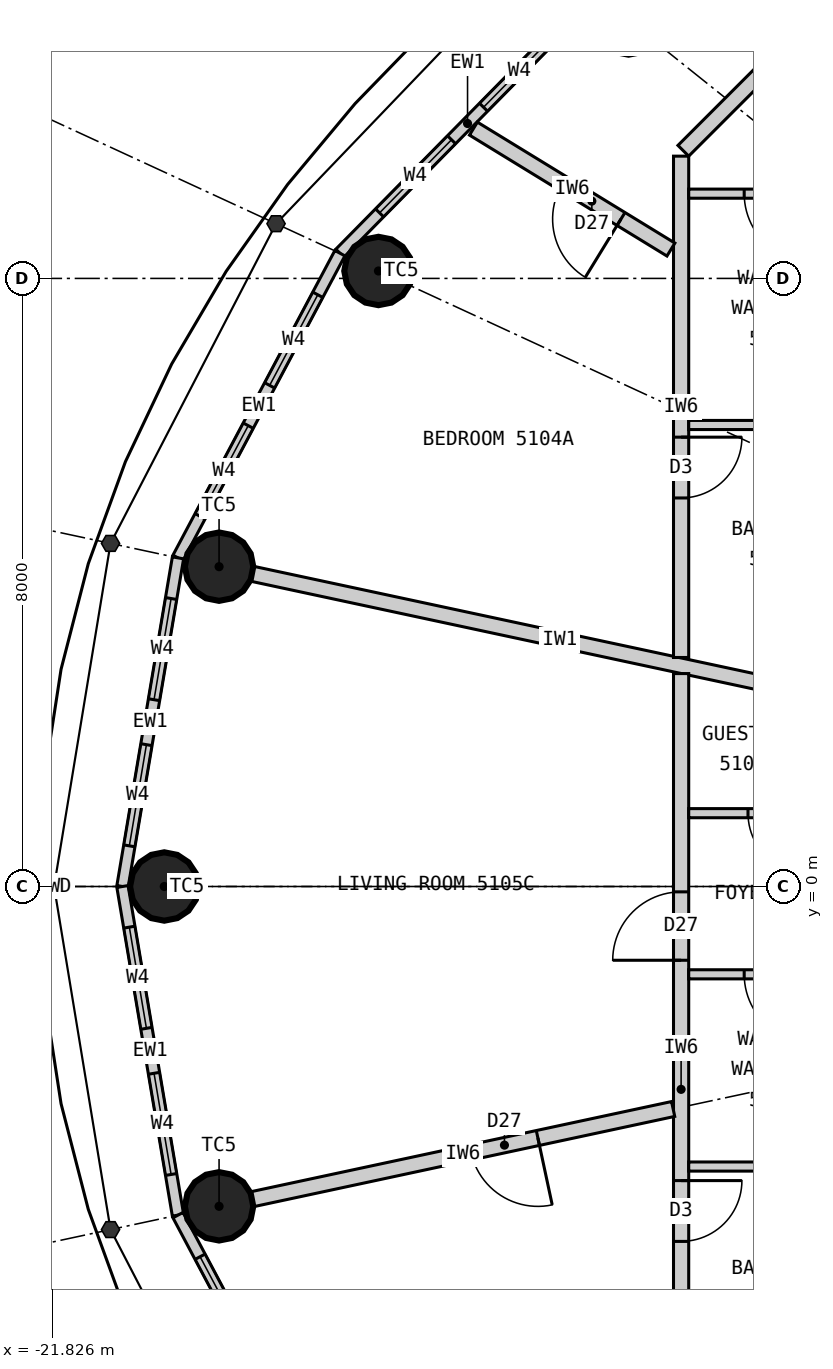
"""IFC4 building model, lengths in metres.
Left out: names, types, materials, properties, quantities, classifications, styles, units other than length and angle.
Written with IfcOpenShell. Run it as: python <this file> out.ifc"""

import sys

from ifc_helpers import new_model, si_unit, direction, frame, frame_2d, origin, origin_2d, place, context, subcontext, project, spatial, rectangle, circle, extrude, element, fill, save


model = new_model("IFC4")
c1 = context("Model", 3, precision=1e-05, world=origin(), true_north=direction((0.0, 1.0)))
c2 = subcontext(c1, "Body", "Model", "MODEL_VIEW")
j1 = project(units=[si_unit("LENGTHUNIT", "METRE"), si_unit("PLANEANGLEUNIT", "RADIAN")], contexts=[c1])
p1 = place(None, origin())
s1 = spatial("IfcSite", under=j1, at=p1, CompositionType="ELEMENT")
p2 = place(p1, origin())
s2 = spatial("IfcBuilding", under=s1, at=p2, CompositionType="ELEMENT")
p3 = place(p2, frame((0.0, 0.0, 192.9)))
s3 = spatial("IfcBuildingStorey", under=s2, at=p3, CompositionType="ELEMENT", Elevation=192.9)
for number, where, z_axis, x_axis in (
    (1, (-14.241, 11.393, 0.0), (0.0, 0.0, 1.0), (1.0, 0.0, 0.0)),
    (2, (-17.532, 8.098, 0.0), (0.0, 0.0, 1.0), (1.0, 0.0, 0.0)),
    (3, (-19.629, 4.208, 0.0), (0.0, 0.0, 1.0), (1.0, 0.0, 0.0)),
    (4, (-20.35, 0.0, 0.0), (0.0, 0.0, 1.0), (1.0, 0.0, 0.0)),
    (5, (-19.629, -4.208, 0.0), (0.0, 0.0, 1.0), (1.0, 0.0, 0.0)),
):
    element("IfcColumn", number, at=place(p3, frame(where, z_axis=z_axis, x_axis=x_axis)), inside=s3, PredefinedType="COLUMN", context=c2, shape_type="SweptSolid", body=[
        extrude(circle(Radius=0.45, at=origin_2d()), origin(), (0.0, 0.0, 1.0), 3.3),
    ])
p4 = place(p3, frame((-14.68, 11.744, 0.0), z_axis=(0.0, 0.0, 1.0), x_axis=(-0.701527379618, -0.712642501993, 0.0)))
e6 = element("IfcWall", 6, at=p4, inside=s3, PredefinedType="ELEMENTEDWALL", context=c2, shape_type="SweptSolid", body=[
    extrude(rectangle(XDim=4.788, YDim=0.15, at=frame_2d((2.394, 0.0))), origin(), (0.0, 0.0, 1.0), 3.12),
])
p5 = place(p4, frame((0.744, 0.0, 0.9)))
e7 = element("IfcOpeningElement", 7, at=p5, cuts=e6, PredefinedType="OPENING", context=c2, shape_type="SweptSolid", body=[
    extrude(rectangle(XDim=1.35, YDim=1.9, at=frame_2d((0.675, 0.95))), frame((0.0, 0.085, 0.0), z_axis=(0.0, -1.0, 0.0), x_axis=(1.0, 0.0, 0.0)), (0.0, 0.0, 1.0), 0.17),
])
p6 = place(p4, frame((2.694, 0.0, 0.9)))
e8 = element("IfcOpeningElement", 8, at=p6, cuts=e6, PredefinedType="OPENING", context=c2, shape_type="SweptSolid", body=[
    extrude(rectangle(XDim=1.35, YDim=1.9, at=frame_2d((0.675, 0.95))), frame((0.0, 0.085, 0.0), z_axis=(0.0, -1.0, 0.0), x_axis=(1.0, 0.0, 0.0)), (0.0, 0.0, 1.0), 0.17),
])
p7 = place(p3, frame((-18.04, 8.332, 0.0), z_axis=(0.0, 0.0, 1.0), x_axis=(-0.469256152955, -0.883062094597, 0.0)))
e9 = element("IfcWall", 9, at=p7, inside=s3, PredefinedType="ELEMENTEDWALL", context=c2, shape_type="SweptSolid", body=[
    extrude(rectangle(XDim=4.539, YDim=0.15, at=frame_2d((2.27, 0.0))), origin(), (0.0, 0.0, 1.0), 3.12),
])
p8 = place(p7, frame((0.62, 0.0, 0.9)))
e10 = element("IfcOpeningElement", 10, at=p8, cuts=e9, PredefinedType="OPENING", context=c2, shape_type="SweptSolid", body=[
    extrude(rectangle(XDim=1.35, YDim=1.9, at=frame_2d((0.675, 0.95))), frame((0.0, 0.085, 0.0), z_axis=(0.0, -1.0, 0.0), x_axis=(1.0, 0.0, 0.0)), (0.0, 0.0, 1.0), 0.17),
])
p9 = place(p7, frame((2.57, 0.0, 0.9)))
e11 = element("IfcOpeningElement", 11, at=p9, cuts=e9, PredefinedType="OPENING", context=c2, shape_type="SweptSolid", body=[
    extrude(rectangle(XDim=1.35, YDim=1.9, at=frame_2d((0.675, 0.95))), frame((0.0, 0.085, 0.0), z_axis=(0.0, -1.0, 0.0), x_axis=(1.0, 0.0, 0.0)), (0.0, 0.0, 1.0), 0.17),
])
p10 = place(p3, frame((-20.17, 4.323, 0.0), z_axis=(0.0, 0.0, 1.0), x_axis=(-0.166538513568, -0.986034950445, 0.0)))
e12 = element("IfcWall", 12, at=p10, inside=s3, PredefinedType="ELEMENTEDWALL", context=c2, shape_type="SweptSolid", body=[
    extrude(rectangle(XDim=4.385, YDim=0.15, at=frame_2d((2.192, 0.0))), origin(), (0.0, 0.0, 1.0), 3.12),
])
p11 = place(p10, frame((0.542, 0.0, 0.9)))
e13 = element("IfcOpeningElement", 13, at=p11, cuts=e12, PredefinedType="OPENING", context=c2, shape_type="SweptSolid", body=[
    extrude(rectangle(XDim=1.35, YDim=1.9, at=frame_2d((0.675, 0.95))), frame((0.0, 0.085, 0.0), z_axis=(0.0, -1.0, 0.0), x_axis=(1.0, 0.0, 0.0)), (0.0, 0.0, 1.0), 0.17),
])
p12 = place(p10, frame((2.492, 0.0, 0.9)))
e14 = element("IfcOpeningElement", 14, at=p12, cuts=e12, PredefinedType="OPENING", context=c2, shape_type="SweptSolid", body=[
    extrude(rectangle(XDim=1.35, YDim=1.9, at=frame_2d((0.675, 0.95))), frame((0.0, 0.085, 0.0), z_axis=(0.0, -1.0, 0.0), x_axis=(1.0, 0.0, 0.0)), (0.0, 0.0, 1.0), 0.17),
])
p13 = place(p3, frame((-20.9, 0.0, 0.0), z_axis=(0.0, 0.0, 1.0), x_axis=(0.166538513568, -0.986034950445, 0.0)))
e15 = element("IfcWall", 15, at=p13, inside=s3, PredefinedType="ELEMENTEDWALL", context=c2, shape_type="SweptSolid", body=[
    extrude(rectangle(XDim=4.385, YDim=0.15, at=frame_2d((2.192, 0.0))), origin(), (0.0, 0.0, 1.0), 3.12),
])
p14 = place(p13, frame((0.542, 0.0, 0.9)))
e16 = element("IfcOpeningElement", 16, at=p14, cuts=e15, PredefinedType="OPENING", context=c2, shape_type="SweptSolid", body=[
    extrude(rectangle(XDim=1.35, YDim=1.9, at=frame_2d((0.675, 0.95))), frame((0.0, 0.085, 0.0), z_axis=(0.0, -1.0, 0.0), x_axis=(1.0, 0.0, 0.0)), (0.0, 0.0, 1.0), 0.17),
])
p15 = place(p13, frame((2.492, 0.0, 0.9)))
e17 = element("IfcOpeningElement", 17, at=p15, cuts=e15, PredefinedType="OPENING", context=c2, shape_type="SweptSolid", body=[
    extrude(rectangle(XDim=1.35, YDim=1.9, at=frame_2d((0.675, 0.95))), frame((0.0, 0.085, 0.0), z_axis=(0.0, -1.0, 0.0), x_axis=(1.0, 0.0, 0.0)), (0.0, 0.0, 1.0), 0.17),
])
p16 = place(p3, frame((-20.17, -4.323, 0.0), z_axis=(0.0, 0.0, 1.0), x_axis=(0.469256152955, -0.883062094597, 0.0)))
e18 = element("IfcWall", 18, at=p16, inside=s3, PredefinedType="ELEMENTEDWALL", context=c2, shape_type="SweptSolid", body=[
    extrude(rectangle(XDim=4.539, YDim=0.15, at=frame_2d((2.27, 0.0))), origin(), (0.0, 0.0, 1.0), 3.12),
])
p17 = place(p16, frame((0.62, 0.0, 0.9)))
e19 = element("IfcOpeningElement", 19, at=p17, cuts=e18, PredefinedType="OPENING", context=c2, shape_type="SweptSolid", body=[
    extrude(rectangle(XDim=1.35, YDim=1.9, at=frame_2d((0.675, 0.95))), frame((0.0, 0.085, 0.0), z_axis=(0.0, -1.0, 0.0), x_axis=(1.0, 0.0, 0.0)), (0.0, 0.0, 1.0), 0.17),
])
p18 = place(p16, frame((2.57, 0.0, 0.9)))
e20 = element("IfcOpeningElement", 20, at=p18, cuts=e18, PredefinedType="OPENING", context=c2, shape_type="SweptSolid", body=[
    extrude(rectangle(XDim=1.35, YDim=1.9, at=frame_2d((0.675, 0.95))), frame((0.0, 0.085, 0.0), z_axis=(0.0, -1.0, 0.0), x_axis=(1.0, 0.0, 0.0)), (0.0, 0.0, 1.0), 0.17),
])
p19 = place(p3, frame((-11.1, 2.379, 0.0), z_axis=(0.0, 0.0, 1.0), x_axis=(-0.977789888126, 0.209587534647, 0.0)))
e21 = element("IfcWall", 21, at=p19, inside=s3, PredefinedType="PARTITIONING", context=c2, shape_type="SweptSolid", body=[
    extrude(rectangle(XDim=8.273, YDim=0.2, at=frame_2d((4.136, 0.0))), origin(), (0.0, 0.0, 1.0), 2.27),
])
p20 = place(p3, frame((-10.679, 12.521, 0.0), z_axis=(0.0, 0.0, 1.0), x_axis=(-0.707106781187, -0.707106781187, 0.0)))
e22 = element("IfcWall", 22, at=p20, inside=s3, PredefinedType="PARTITIONING", context=c2, shape_type="SweptSolid", body=[
    extrude(rectangle(XDim=4.019, YDim=0.2, at=frame_2d((2.009, 0.0))), origin(), (0.0, 0.0, 1.0), 3.12),
])
p21 = place(p3, frame((-13.55, 9.609, 0.0), z_axis=(0.0, 0.0, 1.0), x_axis=(0.0, -1.0, 0.0)))
e23 = element("IfcWall", 23, at=p21, inside=s3, PredefinedType="PARTITIONING", context=c2, shape_type="SweptSolid", body=[
    extrude(rectangle(XDim=6.596, YDim=0.2, at=frame_2d((3.298, 0.0))), origin(), (0.0, 0.0, 1.0), 3.12),
])
p22 = place(p21, frame((3.697, 0.0, 0.0)))
e24 = element("IfcOpeningElement", 24, at=p22, cuts=e23, PredefinedType="OPENING", context=c2, shape_type="SweptSolid", body=[
    extrude(rectangle(XDim=0.8, YDim=2.1, at=frame_2d((0.4, 1.05))), frame((0.0, 0.11, 0.0), z_axis=(0.0, -1.0, 0.0), x_axis=(1.0, 0.0, 0.0)), (0.0, 0.0, 1.0), 0.22),
])
p23 = place(p3, frame((-13.684, 8.38, 0.0), z_axis=(0.0, 0.0, 1.0), x_axis=(-0.852784302627, 0.522263279576, 0.0)))
e25 = element("IfcWall", 25, at=p23, inside=s3, PredefinedType="PARTITIONING", context=c2, shape_type="SweptSolid", body=[
    extrude(rectangle(XDim=3.047, YDim=0.2, at=frame_2d((1.523, 0.0))), origin(), (0.0, 0.0, 1.0), 3.12),
])
p24 = place(p23, frame((0.77, 0.0, 0.0)))
e26 = element("IfcOpeningElement", 26, at=p24, cuts=e25, PredefinedType="OPENING", context=c2, shape_type="SweptSolid", body=[
    extrude(rectangle(XDim=0.9, YDim=2.1, at=frame_2d((0.45, 1.05))), frame((0.0, 0.11, 0.0), z_axis=(0.0, -1.0, 0.0), x_axis=(1.0, 0.0, 0.0)), (0.0, 0.0, 1.0), 0.22),
])
p25 = place(p3, frame((-11.1, 9.115, 0.0), z_axis=(0.0, 0.0, 1.0), x_axis=(-1.0, 0.0, 0.0)))
e27 = element("IfcWall", 27, at=p25, inside=s3, PredefinedType="PARTITIONING", context=c2, shape_type="SweptSolid", body=[
    extrude(rectangle(XDim=2.35, YDim=0.12, at=frame_2d((1.175, 0.0))), origin(), (0.0, 0.0, 1.0), 3.12),
])
p26 = place(p25, frame((0.72, 0.0, 0.0)))
e28 = element("IfcOpeningElement", 28, at=p26, cuts=e27, PredefinedType="OPENING", context=c2, shape_type="SweptSolid", body=[
    extrude(rectangle(XDim=0.9, YDim=2.1, at=frame_2d((0.45, 1.05))), frame((0.0, 0.07, 0.0), z_axis=(0.0, -1.0, 0.0), x_axis=(1.0, 0.0, 0.0)), (0.0, 0.0, 1.0), 0.14),
])
p27 = place(p3, frame((-11.1, 6.072, 0.0), z_axis=(0.0, 0.0, 1.0), x_axis=(-1.0, 0.0, 0.0)))
e29 = element("IfcWall", 29, at=p27, inside=s3, PredefinedType="PARTITIONING", context=c2, shape_type="SweptSolid", body=[
    extrude(rectangle(XDim=2.35, YDim=0.12, at=frame_2d((1.175, 0.0))), origin(), (0.0, 0.0, 1.0), 3.12),
])
p28 = place(p3, frame((-13.55, 2.801, 0.0), z_axis=(0.0, 0.0, 1.0), x_axis=(0.0, -1.0, 0.0)))
e30 = element("IfcWall", 30, at=p28, inside=s3, PredefinedType="PARTITIONING", context=c2, shape_type="SweptSolid", body=[
    extrude(rectangle(XDim=10.94, YDim=0.2, at=frame_2d((5.47, 0.0))), origin(), (0.0, 0.0, 1.0), 3.12),
])
p29 = place(p28, frame((6.67, 0.0, 0.0)))
e31 = element("IfcOpeningElement", 31, at=p29, cuts=e30, PredefinedType="OPENING", context=c2, shape_type="SweptSolid", body=[
    extrude(rectangle(XDim=0.8, YDim=2.1, at=frame_2d((0.4, 1.05))), frame((0.0, 0.11, 0.0), z_axis=(0.0, -1.0, 0.0), x_axis=(1.0, 0.0, 0.0)), (0.0, 0.0, 1.0), 0.22),
])
p30 = place(p28, frame((2.872, 0.0, 0.0)))
e32 = element("IfcOpeningElement", 32, at=p30, cuts=e30, PredefinedType="OPENING", context=c2, shape_type="SweptSolid", body=[
    extrude(rectangle(XDim=0.9, YDim=2.1, at=frame_2d((0.45, 1.05))), frame((0.0, 0.11, 0.0), z_axis=(0.0, -1.0, 0.0), x_axis=(1.0, 0.0, 0.0)), (0.0, 0.0, 1.0), 0.22),
])
p31 = place(p3, frame((-13.655, -2.927, 0.0), z_axis=(0.0, 0.0, 1.0), x_axis=(-0.977790419294, -0.209585056568, 0.0)))
e33 = element("IfcWall", 33, at=p31, inside=s3, PredefinedType="PARTITIONING", context=c2, shape_type="SweptSolid", body=[
    extrude(rectangle(XDim=5.66, YDim=0.2, at=frame_2d((2.83, 0.0))), origin(), (0.0, 0.0, 1.0), 2.27),
])
p32 = place(p31, frame((1.82, 0.0, 0.0)))
e34 = element("IfcOpeningElement", 34, at=p32, cuts=e33, PredefinedType="OPENING", context=c2, shape_type="SweptSolid", body=[
    extrude(rectangle(XDim=0.9, YDim=2.1, at=frame_2d((0.45, 1.05))), frame((0.0, 0.11, 0.0), z_axis=(0.0, -1.0, 0.0), x_axis=(1.0, 0.0, 0.0)), (0.0, 0.0, 1.0), 0.22),
])
p33 = place(p3, frame((-11.1, 0.965, 0.0), z_axis=(0.0, 0.0, 1.0), x_axis=(-1.0, 0.0, 0.0)))
e35 = element("IfcWall", 35, at=p33, inside=s3, PredefinedType="PARTITIONING", context=c2, shape_type="SweptSolid", body=[
    extrude(rectangle(XDim=2.35, YDim=0.12, at=frame_2d((1.175, 0.0))), origin(), (0.0, 0.0, 1.0), 3.12),
])
p34 = place(p33, frame((0.77, 0.0, 0.0)))
e36 = element("IfcOpeningElement", 36, at=p34, cuts=e35, PredefinedType="OPENING", context=c2, shape_type="SweptSolid", body=[
    extrude(rectangle(XDim=0.8, YDim=2.1, at=frame_2d((0.4, 1.05))), frame((0.0, 0.07, 0.0), z_axis=(0.0, -1.0, 0.0), x_axis=(1.0, 0.0, 0.0)), (0.0, 0.0, 1.0), 0.14),
])
p35 = place(p3, frame((-11.1, -1.155, 0.0), z_axis=(0.0, 0.0, 1.0), x_axis=(-1.0, 0.0, 0.0)))
e37 = element("IfcWall", 37, at=p35, inside=s3, PredefinedType="PARTITIONING", context=c2, shape_type="SweptSolid", body=[
    extrude(rectangle(XDim=2.35, YDim=0.12, at=frame_2d((1.175, 0.0))), origin(), (0.0, 0.0, 1.0), 3.12),
])
p36 = place(p35, frame((0.72, 0.0, 0.0)))
e38 = element("IfcOpeningElement", 38, at=p36, cuts=e37, PredefinedType="OPENING", context=c2, shape_type="SweptSolid", body=[
    extrude(rectangle(XDim=0.9, YDim=2.1, at=frame_2d((0.45, 1.05))), frame((0.0, 0.07, 0.0), z_axis=(0.0, -1.0, 0.0), x_axis=(1.0, 0.0, 0.0)), (0.0, 0.0, 1.0), 0.14),
])
p37 = place(p3, frame((-11.1, -3.684, 0.0), z_axis=(0.0, 0.0, 1.0), x_axis=(-1.0, 0.0, 0.0)))
e39 = element("IfcWall", 39, at=p37, inside=s3, PredefinedType="PARTITIONING", context=c2, shape_type="SweptSolid", body=[
    extrude(rectangle(XDim=2.35, YDim=0.12, at=frame_2d((1.175, 0.0))), origin(), (0.0, 0.0, 1.0), 3.12),
])
p38 = place(p5, origin())
e40 = element("IfcWindow", 40, at=p38, inside=s3, PartitioningType="SINGLE_PANEL", PredefinedType="WINDOW", context=c2, shape_type="SweptSolid", body=[
    extrude(rectangle(XDim=1.35, YDim=1.9, at=frame_2d((0.675, 0.95))), frame((0.0, 0.03, 0.0), z_axis=(0.0, -1.0, 0.0), x_axis=(1.0, 0.0, 0.0)), (0.0, 0.0, 1.0), 0.06),
])
fill(e7, e40)
p39 = place(p6, origin())
e41 = element("IfcWindow", 41, at=p39, inside=s3, PartitioningType="SINGLE_PANEL", PredefinedType="WINDOW", context=c2, shape_type="SweptSolid", body=[
    extrude(rectangle(XDim=1.35, YDim=1.9, at=frame_2d((0.675, 0.95))), frame((0.0, 0.03, 0.0), z_axis=(0.0, -1.0, 0.0), x_axis=(1.0, 0.0, 0.0)), (0.0, 0.0, 1.0), 0.06),
])
fill(e8, e41)
p40 = place(p8, origin())
e42 = element("IfcWindow", 42, at=p40, inside=s3, PartitioningType="SINGLE_PANEL", PredefinedType="WINDOW", context=c2, shape_type="SweptSolid", body=[
    extrude(rectangle(XDim=1.35, YDim=1.9, at=frame_2d((0.675, 0.95))), frame((0.0, 0.03, 0.0), z_axis=(0.0, -1.0, 0.0), x_axis=(1.0, 0.0, 0.0)), (0.0, 0.0, 1.0), 0.06),
])
fill(e10, e42)
p41 = place(p9, origin())
e43 = element("IfcWindow", 43, at=p41, inside=s3, PartitioningType="SINGLE_PANEL", PredefinedType="WINDOW", context=c2, shape_type="SweptSolid", body=[
    extrude(rectangle(XDim=1.35, YDim=1.9, at=frame_2d((0.675, 0.95))), frame((0.0, 0.03, 0.0), z_axis=(0.0, -1.0, 0.0), x_axis=(1.0, 0.0, 0.0)), (0.0, 0.0, 1.0), 0.06),
])
fill(e11, e43)
p42 = place(p11, origin())
e44 = element("IfcWindow", 44, at=p42, inside=s3, PartitioningType="SINGLE_PANEL", PredefinedType="WINDOW", context=c2, shape_type="SweptSolid", body=[
    extrude(rectangle(XDim=1.35, YDim=1.9, at=frame_2d((0.675, 0.95))), frame((0.0, 0.03, 0.0), z_axis=(0.0, -1.0, 0.0), x_axis=(1.0, 0.0, 0.0)), (0.0, 0.0, 1.0), 0.06),
])
fill(e13, e44)
p43 = place(p12, origin())
e45 = element("IfcWindow", 45, at=p43, inside=s3, PartitioningType="SINGLE_PANEL", PredefinedType="WINDOW", context=c2, shape_type="SweptSolid", body=[
    extrude(rectangle(XDim=1.35, YDim=1.9, at=frame_2d((0.675, 0.95))), frame((0.0, 0.03, 0.0), z_axis=(0.0, -1.0, 0.0), x_axis=(1.0, 0.0, 0.0)), (0.0, 0.0, 1.0), 0.06),
])
fill(e14, e45)
p44 = place(p14, origin())
e46 = element("IfcWindow", 46, at=p44, inside=s3, PartitioningType="SINGLE_PANEL", PredefinedType="WINDOW", context=c2, shape_type="SweptSolid", body=[
    extrude(rectangle(XDim=1.35, YDim=1.9, at=frame_2d((0.675, 0.95))), frame((0.0, 0.03, 0.0), z_axis=(0.0, -1.0, 0.0), x_axis=(1.0, 0.0, 0.0)), (0.0, 0.0, 1.0), 0.06),
])
fill(e16, e46)
p45 = place(p15, origin())
e47 = element("IfcWindow", 47, at=p45, inside=s3, PartitioningType="SINGLE_PANEL", PredefinedType="WINDOW", context=c2, shape_type="SweptSolid", body=[
    extrude(rectangle(XDim=1.35, YDim=1.9, at=frame_2d((0.675, 0.95))), frame((0.0, 0.03, 0.0), z_axis=(0.0, -1.0, 0.0), x_axis=(1.0, 0.0, 0.0)), (0.0, 0.0, 1.0), 0.06),
])
fill(e17, e47)
p46 = place(p17, origin())
e48 = element("IfcWindow", 48, at=p46, inside=s3, PartitioningType="SINGLE_PANEL", PredefinedType="WINDOW", context=c2, shape_type="SweptSolid", body=[
    extrude(rectangle(XDim=1.35, YDim=1.9, at=frame_2d((0.675, 0.95))), frame((0.0, 0.03, 0.0), z_axis=(0.0, -1.0, 0.0), x_axis=(1.0, 0.0, 0.0)), (0.0, 0.0, 1.0), 0.06),
])
fill(e19, e48)
p47 = place(p26, origin())
e49 = element("IfcDoor", 49, at=p47, inside=s3, OperationType="SINGLE_SWING_LEFT", PredefinedType="DOOR", context=c2, shape_type="SweptSolid", body=[
    extrude(rectangle(XDim=0.9, YDim=2.1, at=frame_2d((0.45, 1.05))), frame((0.0, 0.025, 0.0), z_axis=(0.0, -1.0, 0.0), x_axis=(1.0, 0.0, 0.0)), (0.0, 0.0, 1.0), 0.05),
])
fill(e28, e49)
p48 = place(p22, origin())
e50 = element("IfcDoor", 50, at=p48, inside=s3, OperationType="SINGLE_SWING_LEFT", PredefinedType="DOOR", context=c2, shape_type="SweptSolid", body=[
    extrude(rectangle(XDim=0.8, YDim=2.1, at=frame_2d((0.4, 1.05))), frame((0.0, 0.025, 0.0), z_axis=(0.0, -1.0, 0.0), x_axis=(1.0, 0.0, 0.0)), (0.0, 0.0, 1.0), 0.05),
])
fill(e24, e50)
p49 = place(p24, origin())
e51 = element("IfcDoor", 51, at=p49, inside=s3, OperationType="SINGLE_SWING_LEFT", PredefinedType="DOOR", context=c2, shape_type="SweptSolid", body=[
    extrude(rectangle(XDim=0.9, YDim=2.1, at=frame_2d((0.45, 1.05))), frame((0.0, 0.025, 0.0), z_axis=(0.0, -1.0, 0.0), x_axis=(1.0, 0.0, 0.0)), (0.0, 0.0, 1.0), 0.05),
])
fill(e26, e51)
p50 = place(p34, origin())
e52 = element("IfcDoor", 52, at=p50, inside=s3, OperationType="SINGLE_SWING_LEFT", PredefinedType="DOOR", context=c2, shape_type="SweptSolid", body=[
    extrude(rectangle(XDim=0.8, YDim=2.1, at=frame_2d((0.4, 1.05))), frame((0.0, 0.025, 0.0), z_axis=(0.0, -1.0, 0.0), x_axis=(1.0, 0.0, 0.0)), (0.0, 0.0, 1.0), 0.05),
])
fill(e36, e52)
p51 = place(p36, origin())
e53 = element("IfcDoor", 53, at=p51, inside=s3, OperationType="SINGLE_SWING_LEFT", PredefinedType="DOOR", context=c2, shape_type="SweptSolid", body=[
    extrude(rectangle(XDim=0.9, YDim=2.1, at=frame_2d((0.45, 1.05))), frame((0.0, 0.025, 0.0), z_axis=(0.0, -1.0, 0.0), x_axis=(1.0, 0.0, 0.0)), (0.0, 0.0, 1.0), 0.05),
])
fill(e38, e53)
p52 = place(p29, origin())
e54 = element("IfcDoor", 54, at=p52, inside=s3, OperationType="SINGLE_SWING_LEFT", PredefinedType="DOOR", context=c2, shape_type="SweptSolid", body=[
    extrude(rectangle(XDim=0.8, YDim=2.1, at=frame_2d((0.4, 1.05))), frame((0.0, 0.025, 0.0), z_axis=(0.0, -1.0, 0.0), x_axis=(1.0, 0.0, 0.0)), (0.0, 0.0, 1.0), 0.05),
])
fill(e31, e54)
p53 = place(p30, origin())
e55 = element("IfcDoor", 55, at=p53, inside=s3, OperationType="SINGLE_SWING_RIGHT", PredefinedType="DOOR", context=c2, shape_type="SweptSolid", body=[
    extrude(rectangle(XDim=0.9, YDim=2.1, at=frame_2d((0.45, 1.05))), frame((0.0, 0.025, 0.0), z_axis=(0.0, -1.0, 0.0), x_axis=(1.0, 0.0, 0.0)), (0.0, 0.0, 1.0), 0.05),
])
fill(e32, e55)
p54 = place(p32, origin())
e56 = element("IfcDoor", 56, at=p54, inside=s3, OperationType="SINGLE_SWING_LEFT", PredefinedType="DOOR", context=c2, shape_type="SweptSolid", body=[
    extrude(rectangle(XDim=0.9, YDim=2.1, at=frame_2d((0.45, 1.05))), frame((0.0, 0.025, 0.0), z_axis=(0.0, -1.0, 0.0), x_axis=(1.0, 0.0, 0.0)), (0.0, 0.0, 1.0), 0.05),
])
fill(e34, e56)
save(model, sys.argv[1])
